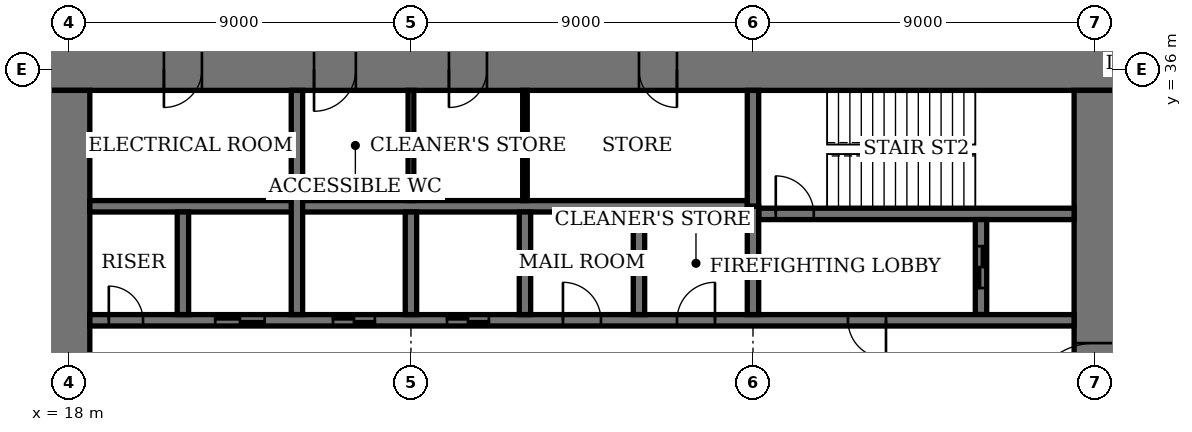
"""IFC4 building model, lengths in metres.
Left out: names, types, materials, properties, quantities, classifications, styles, units other than length and angle.
Written with IfcOpenShell. Run it as: python <this file> out.ifc"""

import sys

from ifc_helpers import new_model, si_unit, direction, frame, frame_2d, origin, place, context, subcontext, project, spatial, rectangle, extrude, element, fill, save


model = new_model("IFC4")
c1 = context("Model", 3, precision=1e-05, world=origin(), true_north=direction((0.0, 1.0)))
c2 = subcontext(c1, "Body", "Model", "MODEL_VIEW")
j1 = project(units=[si_unit("LENGTHUNIT", "METRE"), si_unit("PLANEANGLEUNIT", "RADIAN")], contexts=[c1])
p1 = place(None, origin())
s1 = spatial("IfcSite", under=j1, at=p1, CompositionType="ELEMENT")
p2 = place(p1, origin())
s2 = spatial("IfcBuilding", under=s1, at=p2, CompositionType="ELEMENT")
p3 = place(p2, frame((0.0, 0.0, 218.2)))
s3 = spatial("IfcBuildingStorey", under=s2, at=p3, CompositionType="ELEMENT", Elevation=218.2)
p4 = place(p3, frame((45.55, 36.0, 0.0), z_axis=(0.0, 0.0, 1.0), x_axis=(-1.0, 0.0, 0.0)))
e1 = element("IfcWall", 1, at=p4, inside=s3, PredefinedType="SHEAR", context=c2, shape_type="SweptSolid", body=[
    extrude(rectangle(XDim=28.1, YDim=1.1, at=frame_2d((14.05, 0.0))), origin(), (0.0, 0.0, 1.0), 4.0),
])
p5 = place(p4, frame((11.55, 0.0, 0.0)))
e2 = element("IfcOpeningElement", 2, at=p5, cuts=e1, PredefinedType="OPENING", context=c2, shape_type="SweptSolid", body=[
    extrude(rectangle(XDim=1.0, YDim=2.4, at=frame_2d((0.5, 1.2))), frame((0.0, 0.56, 0.0), z_axis=(0.0, -1.0, 0.0), x_axis=(1.0, 0.0, 0.0)), (0.0, 0.0, 1.0), 1.12),
])
p6 = place(p4, frame((16.55, 0.0, 0.0)))
e3 = element("IfcOpeningElement", 3, at=p6, cuts=e1, PredefinedType="OPENING", context=c2, shape_type="SweptSolid", body=[
    extrude(rectangle(XDim=1.0, YDim=2.4, at=frame_2d((0.5, 1.2))), frame((0.0, 0.56, 0.0), z_axis=(0.0, -1.0, 0.0), x_axis=(1.0, 0.0, 0.0)), (0.0, 0.0, 1.0), 1.12),
])
p7 = place(p4, frame((20.0, 0.0, 0.0)))
e4 = element("IfcOpeningElement", 4, at=p7, cuts=e1, PredefinedType="OPENING", context=c2, shape_type="SweptSolid", body=[
    extrude(rectangle(XDim=1.1, YDim=2.4, at=frame_2d((0.55, 1.2))), frame((0.0, 0.56, 0.0), z_axis=(0.0, -1.0, 0.0), x_axis=(1.0, 0.0, 0.0)), (0.0, 0.0, 1.0), 1.12),
])
p8 = place(p4, frame((24.05, 0.0, 0.0)))
e5 = element("IfcOpeningElement", 5, at=p8, cuts=e1, PredefinedType="OPENING", context=c2, shape_type="SweptSolid", body=[
    extrude(rectangle(XDim=1.0, YDim=2.4, at=frame_2d((0.5, 1.2))), frame((0.0, 0.56, 0.0), z_axis=(0.0, -1.0, 0.0), x_axis=(1.0, 0.0, 0.0)), (0.0, 0.0, 1.0), 1.12),
])
p9 = place(p3, frame((18.0, 35.45, 0.0), z_axis=(0.0, 0.0, 1.0), x_axis=(0.0, -1.0, 0.0)))
e6 = element("IfcWall", 6, at=p9, inside=s3, PredefinedType="SHEAR", context=c2, shape_type="SweptSolid", body=[
    extrude(rectangle(XDim=16.9, YDim=1.1, at=frame_2d((8.45, 0.0))), origin(), (0.0, 0.0, 1.0), 4.0),
])
p10 = place(p9, frame((8.45, 0.0, 0.0)))
e7 = element("IfcOpeningElement", 7, at=p10, cuts=e6, PredefinedType="OPENING", context=c2, shape_type="SweptSolid", body=[
    extrude(rectangle(XDim=1.8, YDim=2.4, at=frame_2d((0.9, 1.2))), frame((0.0, 0.56, 0.0), z_axis=(0.0, -1.0, 0.0), x_axis=(1.0, 0.0, 0.0)), (0.0, 0.0, 1.0), 1.12),
])
p11 = place(p3, frame((45.0, 18.55, 0.0), z_axis=(0.0, 0.0, 1.0), x_axis=(0.0, 1.0, 0.0)))
e8 = element("IfcWall", 8, at=p11, inside=s3, PredefinedType="SHEAR", context=c2, shape_type="SweptSolid", body=[
    extrude(rectangle(XDim=16.9, YDim=1.1, at=frame_2d((8.45, 0.0))), origin(), (0.0, 0.0, 1.0), 4.0),
])
p12 = place(p11, frame((8.45, 0.0, 0.0)))
e9 = element("IfcOpeningElement", 9, at=p12, cuts=e8, PredefinedType="OPENING", context=c2, shape_type="SweptSolid", body=[
    extrude(rectangle(XDim=1.8, YDim=2.4, at=frame_2d((0.9, 1.2))), frame((0.0, 0.56, 0.0), z_axis=(0.0, -1.0, 0.0), x_axis=(1.0, 0.0, 0.0)), (0.0, 0.0, 1.0), 1.12),
])
p13 = place(p3, frame((36.15, 32.2, 0.0), z_axis=(0.0, 0.0, 1.0), x_axis=(1.0, 0.0, 0.0)))
e10 = element("IfcWall", 10, at=p13, inside=s3, PredefinedType="SHEAR", context=c2, shape_type="SweptSolid", body=[
    extrude(rectangle(XDim=8.3, YDim=0.3, at=frame_2d((4.15, 0.0))), origin(), (0.0, 0.0, 1.0), 4.0),
])
p14 = place(p13, frame((0.45, 0.0, 0.0)))
e11 = element("IfcOpeningElement", 11, at=p14, cuts=e10, PredefinedType="OPENING", context=c2, shape_type="SweptSolid", body=[
    extrude(rectangle(XDim=1.0, YDim=2.4, at=frame_2d((0.5, 1.2))), frame((0.0, 0.16, 0.0), z_axis=(0.0, -1.0, 0.0), x_axis=(1.0, 0.0, 0.0)), (0.0, 0.0, 1.0), 0.32),
])
p15 = place(p3, frame((36.0, 32.4, 0.0), z_axis=(0.0, 0.0, 1.0), x_axis=(0.0, 1.0, 0.0)))
e12 = element("IfcWall", 12, at=p15, inside=s3, PredefinedType="SHEAR", context=c2, shape_type="SweptSolid", body=[
    extrude(rectangle(XDim=3.05, YDim=0.3, at=frame_2d((1.525, 0.0))), origin(), (0.0, 0.0, 1.0), 4.0),
])
p16 = place(p3, frame((42.0, 29.55, 0.0), z_axis=(0.0, 0.0, 1.0), x_axis=(0.0, 1.0, 0.0)))
e13 = element("IfcWall", 13, at=p16, inside=s3, PredefinedType="SHEAR", context=c2, shape_type="SweptSolid", body=[
    extrude(rectangle(XDim=2.5, YDim=0.3, at=frame_2d((1.25, 0.0))), origin(), (0.0, 0.0, 1.0), 4.0),
])
p17 = place(p16, frame((0.7, 0.0, 0.0)))
e14 = element("IfcOpeningElement", 14, at=p17, cuts=e13, PredefinedType="OPENING", context=c2, shape_type="SweptSolid", body=[
    extrude(rectangle(XDim=1.1, YDim=2.4, at=frame_2d((0.55, 1.2))), frame((0.0, 0.16, 0.0), z_axis=(0.0, -1.0, 0.0), x_axis=(1.0, 0.0, 0.0)), (0.0, 0.0, 1.0), 0.32),
])
p18 = place(p3, frame((18.55, 29.4, 0.0), z_axis=(0.0, 0.0, 1.0), x_axis=(1.0, 0.0, 0.0)))
e15 = element("IfcWall", 15, at=p18, inside=s3, PredefinedType="SHEAR", context=c2, shape_type="SweptSolid", body=[
    extrude(rectangle(XDim=25.9, YDim=0.3, at=frame_2d((12.95, 0.0))), origin(), (0.0, 0.0, 1.0), 4.0),
])
p19 = place(p18, frame((19.95, 0.0, 0.0)))
e16 = element("IfcOpeningElement", 16, at=p19, cuts=e15, PredefinedType="OPENING", context=c2, shape_type="SweptSolid", body=[
    extrude(rectangle(XDim=1.0, YDim=2.4, at=frame_2d((0.5, 1.2))), frame((0.0, 0.16, 0.0), z_axis=(0.0, -1.0, 0.0), x_axis=(1.0, 0.0, 0.0)), (0.0, 0.0, 1.0), 0.32),
])
p20 = place(p18, frame((0.5, 0.0, 0.0)))
e17 = element("IfcOpeningElement", 17, at=p20, cuts=e15, PredefinedType="OPENING", context=c2, shape_type="SweptSolid", body=[
    extrude(rectangle(XDim=0.9, YDim=2.1, at=frame_2d((0.45, 1.05))), frame((0.0, 0.16, 0.0), z_axis=(0.0, -1.0, 0.0), x_axis=(1.0, 0.0, 0.0)), (0.0, 0.0, 1.0), 0.32),
])
p21 = place(p18, frame((15.45, 0.0, 0.0)))
e18 = element("IfcOpeningElement", 18, at=p21, cuts=e15, PredefinedType="OPENING", context=c2, shape_type="SweptSolid", body=[
    extrude(rectangle(XDim=1.0, YDim=2.4, at=frame_2d((0.5, 1.2))), frame((0.0, 0.16, 0.0), z_axis=(0.0, -1.0, 0.0), x_axis=(1.0, 0.0, 0.0)), (0.0, 0.0, 1.0), 0.32),
])
p22 = place(p18, frame((12.45, 0.0, 0.0)))
e19 = element("IfcOpeningElement", 19, at=p22, cuts=e15, PredefinedType="OPENING", context=c2, shape_type="SweptSolid", body=[
    extrude(rectangle(XDim=1.0, YDim=2.4, at=frame_2d((0.5, 1.2))), frame((0.0, 0.16, 0.0), z_axis=(0.0, -1.0, 0.0), x_axis=(1.0, 0.0, 0.0)), (0.0, 0.0, 1.0), 0.32),
])
p23 = place(p18, frame((9.4, 0.0, 0.0)))
e20 = element("IfcOpeningElement", 20, at=p23, cuts=e15, PredefinedType="OPENING", context=c2, shape_type="SweptSolid", body=[
    extrude(rectangle(XDim=1.1, YDim=2.4, at=frame_2d((0.55, 1.2))), frame((0.0, 0.16, 0.0), z_axis=(0.0, -1.0, 0.0), x_axis=(1.0, 0.0, 0.0)), (0.0, 0.0, 1.0), 0.32),
])
p24 = place(p18, frame((6.4, 0.0, 0.0)))
e21 = element("IfcOpeningElement", 21, at=p24, cuts=e15, PredefinedType="OPENING", context=c2, shape_type="SweptSolid", body=[
    extrude(rectangle(XDim=1.1, YDim=2.4, at=frame_2d((0.55, 1.2))), frame((0.0, 0.16, 0.0), z_axis=(0.0, -1.0, 0.0), x_axis=(1.0, 0.0, 0.0)), (0.0, 0.0, 1.0), 0.32),
])
p25 = place(p18, frame((3.3, 0.0, 0.0)))
e22 = element("IfcOpeningElement", 22, at=p25, cuts=e15, PredefinedType="OPENING", context=c2, shape_type="SweptSolid", body=[
    extrude(rectangle(XDim=1.3, YDim=2.4, at=frame_2d((0.65, 1.2))), frame((0.0, 0.16, 0.0), z_axis=(0.0, -1.0, 0.0), x_axis=(1.0, 0.0, 0.0)), (0.0, 0.0, 1.0), 0.32),
])
p26 = place(p3, frame((18.55, 32.4, 0.0), z_axis=(0.0, 0.0, 1.0), x_axis=(1.0, 0.0, 0.0)))
e23 = element("IfcWall", 23, at=p26, inside=s3, PredefinedType="SHEAR", context=c2, shape_type="SweptSolid", body=[
    extrude(rectangle(XDim=17.3, YDim=0.3, at=frame_2d((8.65, 0.0))), origin(), (0.0, 0.0, 1.0), 4.0),
])
for number, where, z_axis, x_axis in (
    (24, (33.0, 29.55, 0.0), (0.0, 0.0, 1.0), (0.0, 1.0, 0.0)),
    (25, (30.0, 29.55, 0.0), (0.0, 0.0, 1.0), (0.0, 1.0, 0.0)),
    (26, (27.0, 29.55, 0.0), (0.0, 0.0, 1.0), (0.0, 1.0, 0.0)),
):
    element("IfcWall", number, at=place(p3, frame(where, z_axis=z_axis, x_axis=x_axis)), inside=s3, PredefinedType="SHEAR", context=c2, shape_type="SweptSolid", body=[
        extrude(rectangle(XDim=2.7, YDim=0.3, at=frame_2d((1.35, 0.0))), origin(), (0.0, 0.0, 1.0), 4.0),
    ])
p27 = place(p3, frame((24.0, 29.55, 0.0), z_axis=(0.0, 0.0, 1.0), x_axis=(0.0, 1.0, 0.0)))
e27 = element("IfcWall", 27, at=p27, inside=s3, PredefinedType="SHEAR", context=c2, shape_type="SweptSolid", body=[
    extrude(rectangle(XDim=5.9, YDim=0.3, at=frame_2d((2.95, 0.0))), origin(), (0.0, 0.0, 1.0), 4.0),
])
p28 = place(p3, frame((21.0, 29.55, 0.0), z_axis=(0.0, 0.0, 1.0), x_axis=(0.0, 1.0, 0.0)))
e28 = element("IfcWall", 28, at=p28, inside=s3, PredefinedType="SHEAR", context=c2, shape_type="SweptSolid", body=[
    extrude(rectangle(XDim=2.7, YDim=0.3, at=frame_2d((1.35, 0.0))), origin(), (0.0, 0.0, 1.0), 4.0),
])
p29 = place(p3, frame((36.0, 29.55, 0.0), z_axis=(0.0, 0.0, 1.0), x_axis=(0.0, 1.0, 0.0)))
e29 = element("IfcWall", 29, at=p29, inside=s3, PredefinedType="SHEAR", context=c2, shape_type="SweptSolid", body=[
    extrude(rectangle(XDim=2.85, YDim=0.3, at=frame_2d((1.425, 0.0))), origin(), (0.0, 0.0, 1.0), 4.0),
])
p30 = place(p3, frame((30.0, 32.55, 0.0), z_axis=(0.0, 0.0, 1.0), x_axis=(0.0, 1.0, 0.0)))
e30 = element("IfcWall", 30, at=p30, inside=s3, PredefinedType="PARTITIONING", context=c2, shape_type="SweptSolid", body=[
    extrude(rectangle(XDim=2.9, YDim=0.12, at=frame_2d((1.45, 0.0))), origin(), (0.0, 0.0, 1.0), 3.75),
])
p31 = place(p3, frame((27.0, 32.55, 0.0), z_axis=(0.0, 0.0, 1.0), x_axis=(0.0, 1.0, 0.0)))
e31 = element("IfcWall", 31, at=p31, inside=s3, PredefinedType="PARTITIONING", context=c2, shape_type="SweptSolid", body=[
    extrude(rectangle(XDim=2.9, YDim=0.15, at=frame_2d((1.45, 0.0))), origin(), (0.0, 0.0, 1.0), 3.75),
])
p32 = place(p12, origin())
e32 = element("IfcDoor", 32, at=p32, inside=s3, OperationType="DOUBLE_DOOR_DOUBLE_SWING", PredefinedType="DOOR", context=c2, shape_type="SweptSolid", body=[
    extrude(rectangle(XDim=1.8, YDim=2.4, at=frame_2d((0.9, 1.2))), frame((0.0, 0.03, 0.0), z_axis=(0.0, -1.0, 0.0), x_axis=(1.0, 0.0, 0.0)), (0.0, 0.0, 1.0), 0.06),
    extrude(rectangle(XDim=0.04, YDim=2.4, at=frame_2d((0.02, 1.2))), frame((0.0, 0.55, 0.0), z_axis=(0.0, -1.0, 0.0), x_axis=(1.0, 0.0, 0.0)), (0.0, 0.0, 1.0), 1.1),
    extrude(rectangle(XDim=0.04, YDim=2.4, at=frame_2d((1.78, 1.2))), frame((0.0, 0.55, 0.0), z_axis=(0.0, -1.0, 0.0), x_axis=(1.0, 0.0, 0.0)), (0.0, 0.0, 1.0), 1.1),
    extrude(rectangle(XDim=1.8, YDim=0.04, at=frame_2d((0.9, 2.38))), frame((0.0, 0.55, 0.0), z_axis=(0.0, -1.0, 0.0), x_axis=(1.0, 0.0, 0.0)), (0.0, 0.0, 1.0), 1.1),
])
fill(e9, e32)
p33 = place(p5, origin())
e33 = element("IfcDoor", 33, at=p33, inside=s3, OperationType="SINGLE_SWING_RIGHT", PredefinedType="DOOR", context=c2, shape_type="SweptSolid", body=[
    extrude(rectangle(XDim=1.0, YDim=2.4, at=frame_2d((0.5, 1.2))), frame((0.0, 0.025, 0.0), z_axis=(0.0, -1.0, 0.0), x_axis=(1.0, 0.0, 0.0)), (0.0, 0.0, 1.0), 0.05),
    extrude(rectangle(XDim=0.04, YDim=2.4, at=frame_2d((0.02, 1.2))), frame((0.0, 0.4, 0.0), z_axis=(0.0, -1.0, 0.0), x_axis=(1.0, 0.0, 0.0)), (0.0, 0.0, 1.0), 0.8),
    extrude(rectangle(XDim=0.04, YDim=2.4, at=frame_2d((0.98, 1.2))), frame((0.0, 0.4, 0.0), z_axis=(0.0, -1.0, 0.0), x_axis=(1.0, 0.0, 0.0)), (0.0, 0.0, 1.0), 0.8),
    extrude(rectangle(XDim=1.0, YDim=0.04, at=frame_2d((0.5, 2.38))), frame((0.0, 0.4, 0.0), z_axis=(0.0, -1.0, 0.0), x_axis=(1.0, 0.0, 0.0)), (0.0, 0.0, 1.0), 0.8),
])
fill(e2, e33)
p34 = place(p6, origin())
e34 = element("IfcDoor", 34, at=p34, inside=s3, OperationType="SINGLE_SWING_LEFT", PredefinedType="DOOR", context=c2, shape_type="SweptSolid", body=[
    extrude(rectangle(XDim=1.0, YDim=2.4, at=frame_2d((0.5, 1.2))), frame((0.0, 0.025, 0.0), z_axis=(0.0, -1.0, 0.0), x_axis=(1.0, 0.0, 0.0)), (0.0, 0.0, 1.0), 0.05),
    extrude(rectangle(XDim=0.04, YDim=2.4, at=frame_2d((0.02, 1.2))), frame((0.0, 0.4, 0.0), z_axis=(0.0, -1.0, 0.0), x_axis=(1.0, 0.0, 0.0)), (0.0, 0.0, 1.0), 0.8),
    extrude(rectangle(XDim=0.04, YDim=2.4, at=frame_2d((0.98, 1.2))), frame((0.0, 0.4, 0.0), z_axis=(0.0, -1.0, 0.0), x_axis=(1.0, 0.0, 0.0)), (0.0, 0.0, 1.0), 0.8),
    extrude(rectangle(XDim=1.0, YDim=0.04, at=frame_2d((0.5, 2.38))), frame((0.0, 0.4, 0.0), z_axis=(0.0, -1.0, 0.0), x_axis=(1.0, 0.0, 0.0)), (0.0, 0.0, 1.0), 0.8),
])
fill(e3, e34)
p35 = place(p7, origin())
e35 = element("IfcDoor", 35, at=p35, inside=s3, OperationType="SINGLE_SWING_LEFT", PredefinedType="DOOR", context=c2, shape_type="SweptSolid", body=[
    extrude(rectangle(XDim=1.1, YDim=2.4, at=frame_2d((0.55, 1.2))), frame((0.0, 0.025, 0.0), z_axis=(0.0, -1.0, 0.0), x_axis=(1.0, 0.0, 0.0)), (0.0, 0.0, 1.0), 0.05),
    extrude(rectangle(XDim=0.04, YDim=2.4, at=frame_2d((0.02, 1.2))), frame((0.0, 0.44, 0.0), z_axis=(0.0, -1.0, 0.0), x_axis=(1.0, 0.0, 0.0)), (0.0, 0.0, 1.0), 0.88),
    extrude(rectangle(XDim=0.04, YDim=2.4, at=frame_2d((1.08, 1.2))), frame((0.0, 0.44, 0.0), z_axis=(0.0, -1.0, 0.0), x_axis=(1.0, 0.0, 0.0)), (0.0, 0.0, 1.0), 0.88),
    extrude(rectangle(XDim=1.1, YDim=0.04, at=frame_2d((0.55, 2.38))), frame((0.0, 0.44, 0.0), z_axis=(0.0, -1.0, 0.0), x_axis=(1.0, 0.0, 0.0)), (0.0, 0.0, 1.0), 0.88),
])
fill(e4, e35)
p36 = place(p8, origin())
e36 = element("IfcDoor", 36, at=p36, inside=s3, OperationType="SINGLE_SWING_LEFT", PredefinedType="DOOR", context=c2, shape_type="SweptSolid", body=[
    extrude(rectangle(XDim=1.0, YDim=2.4, at=frame_2d((0.5, 1.2))), frame((0.0, 0.025, 0.0), z_axis=(0.0, -1.0, 0.0), x_axis=(1.0, 0.0, 0.0)), (0.0, 0.0, 1.0), 0.05),
    extrude(rectangle(XDim=0.04, YDim=2.4, at=frame_2d((0.02, 1.2))), frame((0.0, 0.4, 0.0), z_axis=(0.0, -1.0, 0.0), x_axis=(1.0, 0.0, 0.0)), (0.0, 0.0, 1.0), 0.8),
    extrude(rectangle(XDim=0.04, YDim=2.4, at=frame_2d((0.98, 1.2))), frame((0.0, 0.4, 0.0), z_axis=(0.0, -1.0, 0.0), x_axis=(1.0, 0.0, 0.0)), (0.0, 0.0, 1.0), 0.8),
    extrude(rectangle(XDim=1.0, YDim=0.04, at=frame_2d((0.5, 2.38))), frame((0.0, 0.4, 0.0), z_axis=(0.0, -1.0, 0.0), x_axis=(1.0, 0.0, 0.0)), (0.0, 0.0, 1.0), 0.8),
])
fill(e5, e36)
p37 = place(p14, origin())
e37 = element("IfcDoor", 37, at=p37, inside=s3, OperationType="SINGLE_SWING_RIGHT", PredefinedType="DOOR", context=c2, shape_type="SweptSolid", body=[
    extrude(rectangle(XDim=1.0, YDim=2.4, at=frame_2d((0.5, 1.2))), frame((0.0, 0.03, 0.0), z_axis=(0.0, -1.0, 0.0), x_axis=(1.0, 0.0, 0.0)), (0.0, 0.0, 1.0), 0.06),
])
fill(e11, e37)
p38 = place(p19, origin())
e38 = element("IfcDoor", 38, at=p38, inside=s3, OperationType="SINGLE_SWING_RIGHT", PredefinedType="DOOR", context=c2, shape_type="SweptSolid", body=[
    extrude(rectangle(XDim=1.0, YDim=2.4, at=frame_2d((0.5, 1.2))), frame((0.0, 0.03, 0.0), z_axis=(0.0, -1.0, 0.0), x_axis=(1.0, 0.0, 0.0)), (0.0, 0.0, 1.0), 0.06),
])
fill(e16, e38)
p39 = place(p20, origin())
e39 = element("IfcDoor", 39, at=p39, inside=s3, OperationType="SINGLE_SWING_RIGHT", PredefinedType="DOOR", context=c2, shape_type="SweptSolid", body=[
    extrude(rectangle(XDim=0.9, YDim=2.1, at=frame_2d((0.45, 1.05))), frame((0.0, 0.03, 0.0), z_axis=(0.0, -1.0, 0.0), x_axis=(1.0, 0.0, 0.0)), (0.0, 0.0, 1.0), 0.06),
])
fill(e17, e39)
p40 = place(p21, origin())
e40 = element("IfcDoor", 40, at=p40, inside=s3, OperationType="SINGLE_SWING_LEFT", PredefinedType="DOOR", context=c2, shape_type="SweptSolid", body=[
    extrude(rectangle(XDim=1.0, YDim=2.4, at=frame_2d((0.5, 1.2))), frame((0.0, 0.03, 0.0), z_axis=(0.0, -1.0, 0.0), x_axis=(1.0, 0.0, 0.0)), (0.0, 0.0, 1.0), 0.06),
])
fill(e18, e40)
p41 = place(p22, origin())
e41 = element("IfcDoor", 41, at=p41, inside=s3, OperationType="SINGLE_SWING_RIGHT", PredefinedType="DOOR", context=c2, shape_type="SweptSolid", body=[
    extrude(rectangle(XDim=1.0, YDim=2.4, at=frame_2d((0.5, 1.2))), frame((0.0, 0.03, 0.0), z_axis=(0.0, -1.0, 0.0), x_axis=(1.0, 0.0, 0.0)), (0.0, 0.0, 1.0), 0.06),
])
fill(e19, e41)
p42 = place(p23, origin())
e42 = element("IfcDoor", 42, at=p42, inside=s3, OperationType="DOUBLE_DOOR_SLIDING", PredefinedType="DOOR", context=c2, shape_type="SweptSolid", body=[
    extrude(rectangle(XDim=1.1, YDim=2.4, at=frame_2d((0.55, 1.2))), frame((0.0, 0.02, 0.0), z_axis=(0.0, -1.0, 0.0), x_axis=(1.0, 0.0, 0.0)), (0.0, 0.0, 1.0), 0.04),
])
fill(e20, e42)
p43 = place(p24, origin())
e43 = element("IfcDoor", 43, at=p43, inside=s3, OperationType="DOUBLE_DOOR_SLIDING", PredefinedType="DOOR", context=c2, shape_type="SweptSolid", body=[
    extrude(rectangle(XDim=1.1, YDim=2.4, at=frame_2d((0.55, 1.2))), frame((0.0, 0.02, 0.0), z_axis=(0.0, -1.0, 0.0), x_axis=(1.0, 0.0, 0.0)), (0.0, 0.0, 1.0), 0.04),
])
fill(e21, e43)
p44 = place(p25, origin())
e44 = element("IfcDoor", 44, at=p44, inside=s3, OperationType="DOUBLE_DOOR_SLIDING", PredefinedType="DOOR", context=c2, shape_type="SweptSolid", body=[
    extrude(rectangle(XDim=1.3, YDim=2.4, at=frame_2d((0.65, 1.2))), frame((0.0, 0.02, 0.0), z_axis=(0.0, -1.0, 0.0), x_axis=(1.0, 0.0, 0.0)), (0.0, 0.0, 1.0), 0.04),
])
fill(e22, e44)
p45 = place(p17, origin())
e45 = element("IfcDoor", 45, at=p45, inside=s3, OperationType="DOUBLE_DOOR_SLIDING", PredefinedType="DOOR", context=c2, shape_type="SweptSolid", body=[
    extrude(rectangle(XDim=1.1, YDim=2.4, at=frame_2d((0.55, 1.2))), frame((0.0, 0.03, 0.0), z_axis=(0.0, -1.0, 0.0), x_axis=(1.0, 0.0, 0.0)), (0.0, 0.0, 1.0), 0.06),
])
fill(e14, e45)
save(model, sys.argv[1])
